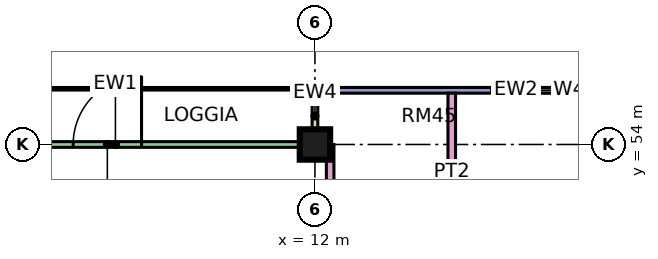
"""IFC4 building model, lengths in metres.
Left out: names, types, materials, properties, quantities, classifications, styles, units other than length and angle.
Written with IfcOpenShell. Run it as: python <this file> out.ifc"""

import sys

from ifc_helpers import new_model, si_unit, direction, frame, frame_2d, origin, origin_2d, place, context, subcontext, project, spatial, rectangle, extrude, element, fill, save


model = new_model("IFC4")
c1 = context("Model", 3, precision=1e-05, world=origin(), true_north=direction((0.0, 1.0)))
c2 = subcontext(c1, "Body", "Model", "MODEL_VIEW")
j1 = project(units=[si_unit("LENGTHUNIT", "METRE"), si_unit("PLANEANGLEUNIT", "RADIAN")], contexts=[c1])
p1 = place(None, origin())
s1 = spatial("IfcSite", under=j1, at=p1, CompositionType="ELEMENT")
p2 = place(p1, origin())
s2 = spatial("IfcBuilding", under=s1, at=p2, CompositionType="ELEMENT")
p3 = place(p2, frame((0.0, 0.0, 288.4)))
s3 = spatial("IfcBuildingStorey", under=s2, at=p3, CompositionType="ELEMENT", Elevation=288.4)
p4 = place(p3, frame((12.0, 54.0, 0.0), z_axis=(0.0, 0.0, 1.0), x_axis=(1.0, 0.0, 0.0)))
e1 = element("IfcColumn", 1, at=p4, inside=s3, PredefinedType="COLUMN", context=c2, shape_type="SweptSolid", body=[
    extrude(rectangle(XDim=0.8, YDim=0.8, at=origin_2d()), origin(), (0.0, 0.0, 1.0), 3.75),
])
p5 = place(p3, frame((22.5, 55.425, 0.0), z_axis=(0.0, 0.0, 1.0), x_axis=(-1.0, 0.0, 0.0)))
e2 = element("IfcWall", 2, at=p5, inside=s3, PredefinedType="SOLIDWALL", context=c2, shape_type="SweptSolid", body=[
    extrude(rectangle(XDim=10.425, YDim=0.15, at=frame_2d((5.212, 0.0))), origin(), (0.0, 0.0, 1.0), 3.35),
])
p6 = place(p5, frame((1.05, 0.0, 0.45)))
e3 = element("IfcOpeningElement", 3, at=p6, cuts=e2, PredefinedType="OPENING", context=c2, shape_type="SweptSolid", body=[
    extrude(rectangle(XDim=4.8, YDim=2.4, at=frame_2d((2.4, 1.2))), frame((0.0, 0.085, 0.0), z_axis=(0.0, -1.0, 0.0), x_axis=(1.0, 0.0, 0.0)), (0.0, 0.0, 1.0), 0.17),
])
p7 = place(p3, frame((11.925, 54.0, 0.0), z_axis=(0.0, 0.0, 1.0), x_axis=(-1.0, 0.0, 0.0)))
e4 = element("IfcWall", 4, at=p7, inside=s3, PredefinedType="SOLIDWALL", context=c2, shape_type="SweptSolid", body=[
    extrude(rectangle(XDim=10.35, YDim=0.15, at=frame_2d((5.175, 0.0))), origin(), (0.0, 0.0, 1.0), 3.35),
])
p8 = place(p7, frame((4.488, 0.0, 0.0)))
e5 = element("IfcOpeningElement", 5, at=p8, cuts=e4, PredefinedType="OPENING", context=c2, shape_type="SweptSolid", body=[
    extrude(rectangle(XDim=1.8, YDim=2.4, at=frame_2d((0.9, 1.2))), frame((0.0, 0.085, 0.0), z_axis=(0.0, -1.0, 0.0), x_axis=(1.0, 0.0, 0.0)), (0.0, 0.0, 1.0), 0.17),
])
p9 = place(p3, frame((12.0, 55.5, 0.0), z_axis=(0.0, 0.0, 1.0), x_axis=(0.0, -1.0, 0.0)))
e6 = element("IfcWall", 6, at=p9, inside=s3, PredefinedType="SOLIDWALL", context=c2, shape_type="SweptSolid", body=[
    extrude(rectangle(XDim=1.5, YDim=0.15, at=frame_2d((0.75, 0.0))), origin(), (0.0, 0.0, 1.0), 3.35),
])
p10 = place(p3, frame((12.4, 20.0, 0.0), z_axis=(0.0, 0.0, 1.0), x_axis=(0.0, 1.0, 0.0)))
e7 = element("IfcWall", 7, at=p10, inside=s3, PredefinedType="PARTITIONING", context=c2, shape_type="SweptSolid", body=[
    extrude(rectangle(XDim=34.0, YDim=0.2, at=frame_2d((17.0, 0.0))), origin(), (0.0, 0.0, 1.0), 3.35),
])
p11 = place(p10, frame((31.95, 0.0, 0.0)))
e8 = element("IfcOpeningElement", 8, at=p11, cuts=e7, PredefinedType="OPENING", context=c2, shape_type="SweptSolid", body=[
    extrude(rectangle(XDim=1.0, YDim=2.1, at=frame_2d((0.5, 1.05))), frame((0.0, 0.11, 0.0), z_axis=(0.0, -1.0, 0.0), x_axis=(1.0, 0.0, 0.0)), (0.0, 0.0, 1.0), 0.22),
])
p12 = place(p10, frame((0.6, 0.0, 0.0)))
e9 = element("IfcOpeningElement", 9, at=p12, cuts=e7, PredefinedType="OPENING", context=c2, shape_type="SweptSolid", body=[
    extrude(rectangle(XDim=1.2, YDim=2.1, at=frame_2d((0.6, 1.05))), frame((0.0, 0.11, 0.0), z_axis=(0.0, -1.0, 0.0), x_axis=(1.0, 0.0, 0.0)), (0.0, 0.0, 1.0), 0.22),
])
p13 = place(p10, frame((13.8, 0.0, 0.0)))
e10 = element("IfcOpeningElement", 10, at=p13, cuts=e7, PredefinedType="OPENING", context=c2, shape_type="SweptSolid", body=[
    extrude(rectangle(XDim=1.0, YDim=2.1, at=frame_2d((0.5, 1.05))), frame((0.0, 0.11, 0.0), z_axis=(0.0, -1.0, 0.0), x_axis=(1.0, 0.0, 0.0)), (0.0, 0.0, 1.0), 0.22),
])
p14 = place(p3, frame((15.6, 51.225, 0.0), z_axis=(0.0, 0.0, 1.0), x_axis=(0.0, 1.0, 0.0)))
e11 = element("IfcWall", 11, at=p14, inside=s3, PredefinedType="PARTITIONING", context=c2, shape_type="SweptSolid", body=[
    extrude(rectangle(XDim=4.125, YDim=0.2, at=frame_2d((2.062, 0.0))), origin(), (0.0, 0.0, 1.0), 3.35),
])
p15 = place(p6, origin())
e12 = element("IfcWindow", 12, at=p15, inside=s3, PartitioningType="SINGLE_PANEL", PredefinedType="WINDOW", context=c2, shape_type="SweptSolid", body=[
    extrude(rectangle(XDim=4.8, YDim=2.4, at=frame_2d((2.4, 1.2))), frame((0.0, 0.03, 0.0), z_axis=(0.0, -1.0, 0.0), x_axis=(1.0, 0.0, 0.0)), (0.0, 0.0, 1.0), 0.06),
])
fill(e3, e12)
p16 = place(p8, frame((1.8, 0.0, 0.0), z_axis=(0.0, 0.0, 1.0), x_axis=(-1.0, 0.0, 0.0)))
e13 = element("IfcDoor", 13, at=p16, inside=s3, OperationType="DOUBLE_DOOR_SINGLE_SWING", PredefinedType="DOOR", context=c2, shape_type="SweptSolid", body=[
    extrude(rectangle(XDim=1.8, YDim=2.4, at=frame_2d((0.9, 1.2))), frame((0.0, 0.025, 0.0), z_axis=(0.0, -1.0, 0.0), x_axis=(1.0, 0.0, 0.0)), (0.0, 0.0, 1.0), 0.05),
])
fill(e5, e13)
save(model, sys.argv[1])
